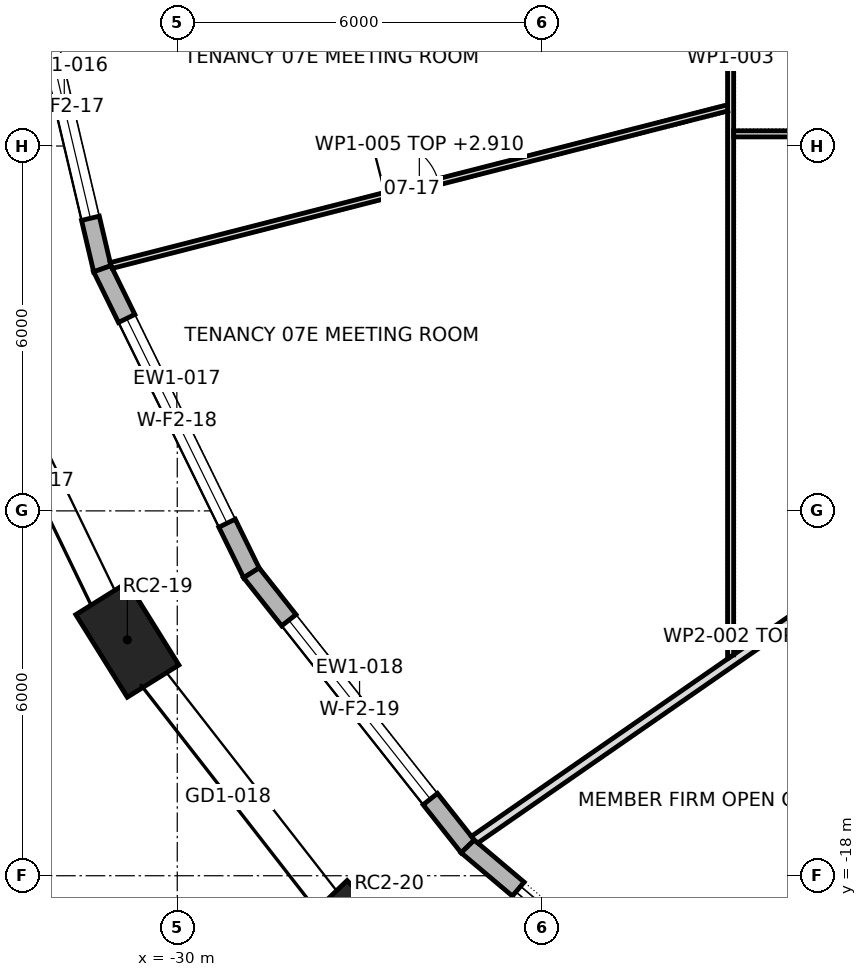
"""IFC4 building model, lengths in metres.
Left out: names, types, materials, properties, quantities, classifications, styles, units other than length and angle.
Written with IfcOpenShell. Run it as: python <this file> out.ifc"""

import sys

from ifc_helpers import new_model, si_unit, direction, frame, frame_2d, origin, origin_2d, place, context, subcontext, project, spatial, polyline, rectangle, outline, extrude, element, fill, save


model = new_model("IFC4")
c1 = context("Model", 3, precision=1e-05, world=origin(), true_north=direction((0.0, 1.0)))
c2 = subcontext(c1, "Body", "Model", "MODEL_VIEW")
j1 = project(units=[si_unit("LENGTHUNIT", "METRE"), si_unit("PLANEANGLEUNIT", "RADIAN")], contexts=[c1])
p1 = place(None, origin())
s1 = spatial("IfcSite", under=j1, at=p1, CompositionType="ELEMENT")
p2 = place(p1, origin())
s2 = spatial("IfcBuilding", under=s1, at=p2, CompositionType="ELEMENT")
p3 = place(p2, frame((0.0, 0.0, 112.9)))
s3 = spatial("IfcBuildingStorey", under=s2, at=p3, CompositionType="ELEMENT", Elevation=112.9)
for number, where, z_axis, x_axis in (
    (1, (-30.821, -14.121, 0.0), (0.0, 0.0, 1.0), (0.529, -0.849, 0.0)),
    (2, (-27.015, -19.003, 0.0), (0.0, 0.0, 1.0), (0.692, -0.722, 0.0)),
):
    element("IfcColumn", number, at=place(p3, frame(where, z_axis=z_axis, x_axis=x_axis)), inside=s3, PredefinedType="COLUMN", context=c2, shape_type="SweptSolid", body=[
        extrude(rectangle(XDim=1.6, YDim=1.0, at=origin_2d()), origin(), (0.0, 0.0, 1.0), 4.2),
    ])
p4 = place(p3, frame((-32.483, -2.708, 0.0), z_axis=(0.0, 0.0, 1.0), x_axis=(0.229193964616, -0.973380771632, 0.0)))
e3 = element("IfcWall", 3, at=p4, inside=s3, PredefinedType="STANDARD", context=c2, shape_type="SweptSolid", body=[
    extrude(outline(polyline([(-0.017, -0.15), (5.473, -0.15), (5.439, 0.15), (0.017, 0.15), (-0.017, -0.15)])), origin(), (0.0, 0.0, 1.0), 3.9),
])
p5 = place(p4, frame((0.853, 0.0, 0.6)))
e4 = element("IfcOpeningElement", 4, at=p5, cuts=e3, PredefinedType="OPENING", context=c2, shape_type="SweptSolid", body=[
    extrude(rectangle(XDim=3.75, YDim=2.85, at=frame_2d((1.875, 1.425))), frame((0.0, 0.162, 0.0), z_axis=(0.0, -1.0, 0.0), x_axis=(1.0, 0.0, 0.0)), (0.0, 0.0, 1.0), 0.324),
])
p6 = place(p3, frame((-31.233, -8.019, 0.0), z_axis=(0.0, 0.0, 1.0), x_axis=(0.440238988749, -0.897880633929, 0.0)))
e5 = element("IfcWall", 5, at=p6, inside=s3, PredefinedType="STANDARD", context=c2, shape_type="SweptSolid", body=[
    extrude(outline(polyline([(-0.017, -0.15), (5.586, -0.15), (5.553, 0.15), (0.017, 0.15), (-0.017, -0.15)])), origin(), (0.0, 0.0, 1.0), 3.9),
])
p7 = place(p6, frame((0.91, 0.0, 0.6)))
e6 = element("IfcOpeningElement", 6, at=p7, cuts=e5, PredefinedType="OPENING", context=c2, shape_type="SweptSolid", body=[
    extrude(rectangle(XDim=3.75, YDim=2.85, at=frame_2d((1.875, 1.425))), frame((0.0, 0.162, 0.0), z_axis=(0.0, -1.0, 0.0), x_axis=(1.0, 0.0, 0.0)), (0.0, 0.0, 1.0), 0.324),
])
p8 = place(p3, frame((-28.781, -13.019, 0.0), z_axis=(0.0, 0.0, 1.0), x_axis=(0.620329992039, -0.784340934146, 0.0)))
e7 = element("IfcWall", 7, at=p8, inside=s3, PredefinedType="STANDARD", context=c2, shape_type="SweptSolid", body=[
    extrude(outline(polyline([(-0.016, -0.15), (5.75, -0.15), (5.72, 0.15), (0.016, 0.15), (-0.016, -0.15)])), origin(), (0.0, 0.0, 1.0), 3.9),
])
p9 = place(p8, frame((0.993, 0.0, 0.6)))
e8 = element("IfcOpeningElement", 8, at=p9, cuts=e7, PredefinedType="OPENING", context=c2, shape_type="SweptSolid", body=[
    extrude(rectangle(XDim=3.75, YDim=2.85, at=frame_2d((1.875, 1.425))), frame((0.0, 0.162, 0.0), z_axis=(0.0, -1.0, 0.0), x_axis=(1.0, 0.0, 0.0)), (0.0, 0.0, 1.0), 0.324),
])
p10 = place(p3, frame((-25.223, -17.518, 0.0), z_axis=(0.0, 0.0, 1.0), x_axis=(0.763894031266, -0.645341699409, 0.0)))
e9 = element("IfcWall", 9, at=p10, inside=s3, PredefinedType="STANDARD", context=c2, shape_type="SweptSolid", body=[
    extrude(outline(polyline([(-0.015, -0.15), (5.939, -0.15), (5.911, 0.15), (0.015, 0.15), (-0.015, -0.15)])), origin(), (0.0, 0.0, 1.0), 3.9),
])
p11 = place(p10, frame((1.087, 0.0, 0.0)))
e10 = element("IfcOpeningElement", 10, at=p11, cuts=e9, PredefinedType="OPENING", context=c2, shape_type="SweptSolid", body=[
    extrude(rectangle(XDim=3.75, YDim=3.45, at=frame_2d((1.875, 1.725))), frame((0.0, 0.162, 0.0), z_axis=(0.0, -1.0, 0.0), x_axis=(1.0, 0.0, 0.0)), (0.0, 0.0, 1.0), 0.324),
])
p12 = place(p3, frame((-25.12, -17.414, 0.0), z_axis=(0.0, 0.0, 1.0), x_axis=(0.822008683907, 0.569474954306, 0.0)))
e11 = element("IfcWall", 11, at=p12, inside=s3, PredefinedType="PARTITIONING", context=c2, shape_type="SweptSolid", body=[
    extrude(outline(polyline([(0.024, -0.075), (1.967, -0.075), (3.91, -0.075), (5.853, -0.075), (7.796, -0.075), (9.739, -0.075), (11.681, -0.075), (11.734, 0.002), (11.734, 0.002), (11.785, 0.074), (11.785, 0.075), (10.15, 0.075), (8.516, 0.075), (6.881, 0.075), (5.246, 0.075), (5.245, 0.072), (5.241, 0.075), (3.494, 0.075), (1.747, 0.075), (0.0, 0.075), (0.0, 0.07), (0.005, -0.002), (0.024, -0.075)])), origin(), (0.0, 0.0, 1.0), 3.147),
])
p13 = place(p3, frame((-20.9, -14.434, 0.0), z_axis=(0.0, 0.0, 1.0), x_axis=(0.0, 1.0, 0.0)))
e12 = element("IfcWall", 12, at=p13, inside=s3, PredefinedType="PARTITIONING", context=c2, shape_type="SweptSolid", body=[
    extrude(outline(polyline([(0.069, -0.05), (1.772, -0.05), (3.475, -0.05), (5.178, -0.05), (6.881, -0.05), (8.583, -0.05), (8.583, -0.05), (8.684, -0.05), (8.684, -0.05), (10.321, -0.05), (11.958, -0.05), (13.596, -0.05), (15.234, -0.05), (15.234, -0.05), (15.333, -0.05), (15.333, -0.05), (16.789, -0.05), (18.245, -0.05), (19.701, -0.05), (19.727, 0.05), (19.727, 0.05), (17.942, 0.05), (16.156, 0.05), (14.372, 0.05), (12.587, 0.05), (10.802, 0.05), (9.017, 0.05), (9.01, 0.048), (9.009, 0.05), (7.208, 0.05), (5.406, 0.05), (3.604, 0.05), (1.802, 0.05), (0.0, 0.05), (0.069, -0.05)])), origin(), (0.0, 0.0, 1.0), 3.9),
])
p14 = place(p13, frame((13.539, 0.0, 0.0)))
e13 = element("IfcOpeningElement", 13, at=p14, cuts=e12, PredefinedType="OPENING", context=c2, shape_type="SweptSolid", body=[
    extrude(rectangle(XDim=0.9, YDim=2.1, at=frame_2d((0.45, 1.05))), frame((0.0, 0.062, 0.0), z_axis=(0.0, -1.0, 0.0), x_axis=(1.0, 0.0, 0.0)), (0.0, 0.0, 1.0), 0.124),
])
p15 = place(p3, frame((-20.85, -5.8, 0.0), z_axis=(0.0, 0.0, 1.0), x_axis=(1.0, 0.0, 0.0)))
e14 = element("IfcWall", 14, at=p15, inside=s3, PredefinedType="PARTITIONING", context=c2, shape_type="SweptSolid", body=[
    extrude(rectangle(XDim=5.375, YDim=0.1, at=frame_2d((2.688, 0.0))), origin(), (0.0, 0.0, 1.0), 3.9),
])
p16 = place(p3, frame((-20.938, -5.37, 0.0), z_axis=(0.0, 0.0, 1.0), x_axis=(-0.968822345516, -0.247756458702, 0.0)))
e15 = element("IfcWall", 15, at=p16, inside=s3, PredefinedType="PARTITIONING", context=c2, shape_type="SweptSolid", body=[
    extrude(outline(polyline([(10.479, -0.05), (10.479, 0.007), (10.47, 0.05), (8.729, 0.05), (6.988, 0.05), (5.248, 0.05), (3.507, 0.05), (1.766, 0.05), (0.025, 0.05), (0.0, -0.05), (0.0, -0.05), (1.747, -0.05), (3.493, -0.05), (5.239, -0.05), (6.986, -0.05), (8.732, -0.05), (10.479, -0.05)])), origin(), (0.0, 0.0, 1.0), 2.91),
])
p17 = place(p16, frame((4.92, 0.0, 0.0)))
e16 = element("IfcOpeningElement", 16, at=p17, cuts=e15, PredefinedType="OPENING", context=c2, shape_type="SweptSolid", body=[
    extrude(rectangle(XDim=0.9, YDim=2.1, at=frame_2d((0.45, 1.05))), frame((0.0, 0.062, 0.0), z_axis=(0.0, -1.0, 0.0), x_axis=(1.0, 0.0, 0.0)), (0.0, 0.0, 1.0), 0.124),
])
p18 = place(p5, origin())
e17 = element("IfcWindow", 17, at=p18, inside=s3, PartitioningType="TRIPLE_PANEL_VERTICAL", PredefinedType="WINDOW", context=c2, shape_type="SweptSolid", body=[
    extrude(rectangle(XDim=3.75, YDim=2.85, at=frame_2d((1.875, 1.425))), frame((0.0, 0.03, 0.0), z_axis=(0.0, -1.0, 0.0), x_axis=(1.0, 0.0, 0.0)), (0.0, 0.0, 1.0), 0.06),
])
fill(e4, e17)
p19 = place(p7, origin())
e18 = element("IfcWindow", 18, at=p19, inside=s3, PartitioningType="TRIPLE_PANEL_VERTICAL", PredefinedType="WINDOW", context=c2, shape_type="SweptSolid", body=[
    extrude(rectangle(XDim=3.75, YDim=2.85, at=frame_2d((1.875, 1.425))), frame((0.0, 0.03, 0.0), z_axis=(0.0, -1.0, 0.0), x_axis=(1.0, 0.0, 0.0)), (0.0, 0.0, 1.0), 0.06),
])
fill(e6, e18)
p20 = place(p9, origin())
e19 = element("IfcWindow", 19, at=p20, inside=s3, PartitioningType="TRIPLE_PANEL_VERTICAL", PredefinedType="WINDOW", context=c2, shape_type="SweptSolid", body=[
    extrude(rectangle(XDim=3.75, YDim=2.85, at=frame_2d((1.875, 1.425))), frame((0.0, 0.03, 0.0), z_axis=(0.0, -1.0, 0.0), x_axis=(1.0, 0.0, 0.0)), (0.0, 0.0, 1.0), 0.06),
])
fill(e8, e19)
p21 = place(p11, origin())
e20 = element("IfcDoor", 20, at=p21, inside=s3, OperationType="DOUBLE_DOOR_SLIDING", PredefinedType="DOOR", context=c2, shape_type="SweptSolid", body=[
    extrude(rectangle(XDim=3.75, YDim=3.45, at=frame_2d((1.875, 1.725))), frame((0.0, 0.025, 0.0), z_axis=(0.0, -1.0, 0.0), x_axis=(1.0, 0.0, 0.0)), (0.0, 0.0, 1.0), 0.05),
])
fill(e10, e20)
p22 = place(p17, frame((0.9, 0.0, 0.0), z_axis=(0.0, 0.0, 1.0), x_axis=(-1.0, 0.0, 0.0)))
e21 = element("IfcDoor", 21, at=p22, inside=s3, OperationType="SINGLE_SWING_RIGHT", PredefinedType="DOOR", context=c2, shape_type="SweptSolid", body=[
    extrude(rectangle(XDim=0.9, YDim=2.1, at=frame_2d((0.45, 1.05))), frame((0.0, 0.025, 0.0), z_axis=(0.0, -1.0, 0.0), x_axis=(1.0, 0.0, 0.0)), (0.0, 0.0, 1.0), 0.05),
])
fill(e16, e21)
save(model, sys.argv[1])
